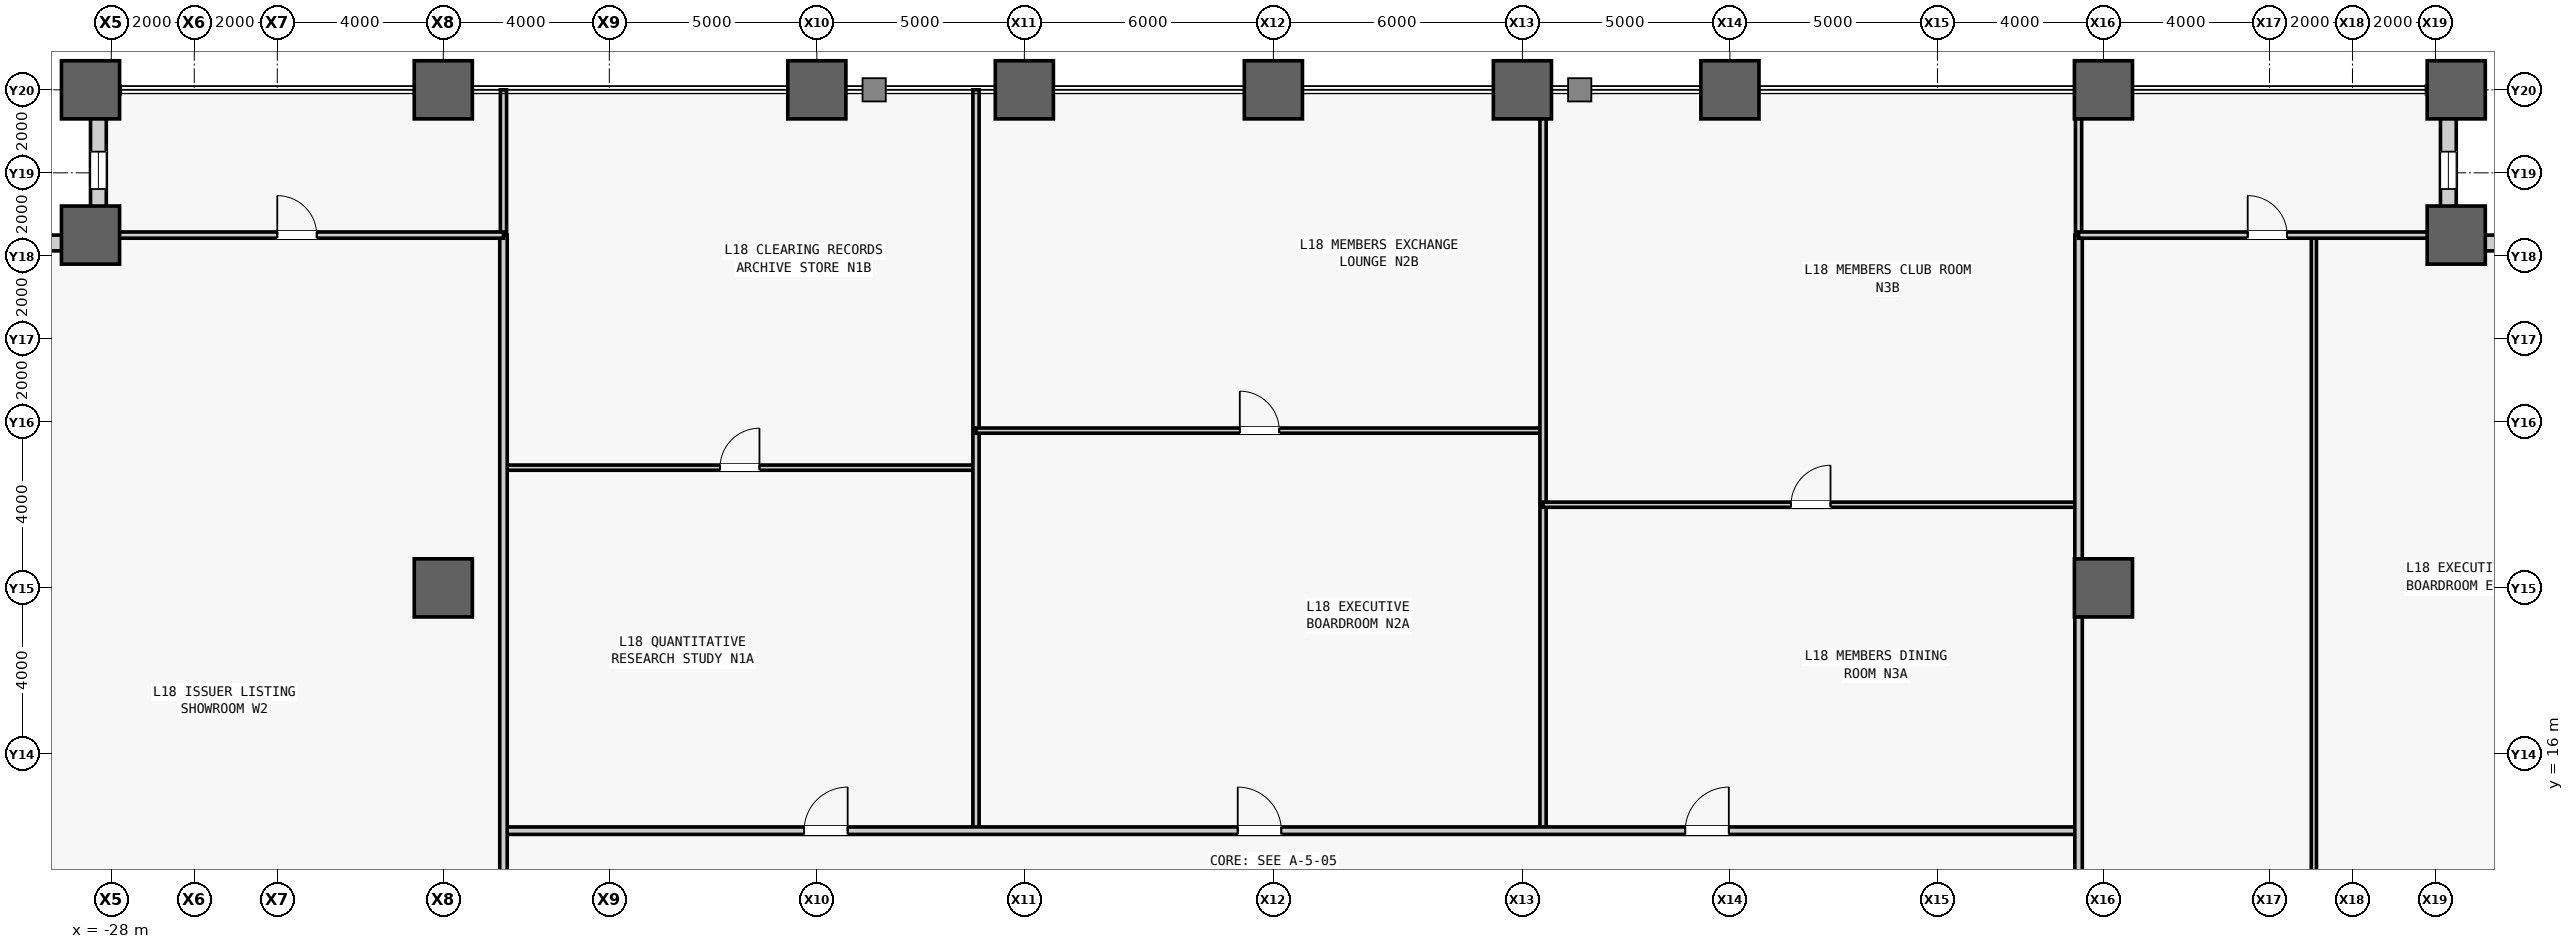
"""IFC4 building model, lengths in metres.
Left out: names, types, materials, properties, quantities, classifications, styles, units other than length and angle.
Written with IfcOpenShell. Run it as: python <this file> out.ifc"""

import sys

from ifc_helpers import new_model, si_unit, direction, frame, frame_2d, origin, origin_2d, place, context, subcontext, project, spatial, rectangle, hollow_rectangle, extrude, source, transform, mapped, element, fill, save


model = new_model("IFC4")
c1 = context("Model", 3, precision=1e-05, world=origin(), true_north=direction((0.0, 1.0)))
c2 = subcontext(c1, "Body", "Model", "MODEL_VIEW")
j1 = project(units=[si_unit("LENGTHUNIT", "METRE"), si_unit("PLANEANGLEUNIT", "RADIAN")], contexts=[c1])
p1 = place(None, origin())
s1 = spatial("IfcSite", under=j1, at=p1, CompositionType="ELEMENT")
p2 = place(p1, origin())
s2 = spatial("IfcBuilding", under=s1, at=p2, CompositionType="ELEMENT")
p3 = place(p2, frame((0.0, 0.0, 83.0)))
s3 = spatial("IfcBuildingStorey", under=s2, at=p3, CompositionType="ELEMENT", Elevation=83.0)
m1 = source(origin(), c2, "Body", "SweptSolid", [
    extrude(hollow_rectangle(XDim=1.4, YDim=1.4, WallThickness=0.075, at=origin_2d()), origin(), (0.0, 0.0, 1.0), 4.2),
])
for number, where, z_axis, x_axis in (
    (1, (-28.5, 28.5, 0.0), (0.0, 0.0, 1.0), (1.0, 0.0, 0.0)),
    (2, (-28.5, 32.0, 0.0), (0.0, 0.0, 1.0), (1.0, 0.0, 0.0)),
    (3, (-20.0, 20.0, 0.0), (0.0, 0.0, 1.0), (1.0, 0.0, 0.0)),
    (4, (-20.0, 32.0, 0.0), (0.0, 0.0, 1.0), (1.0, 0.0, 0.0)),
    (5, (-11.0, 32.0, 0.0), (0.0, 0.0, 1.0), (1.0, 0.0, 0.0)),
    (6, (-6.0, 32.0, 0.0), (0.0, 0.0, 1.0), (1.0, 0.0, 0.0)),
    (7, (0.0, 32.0, 0.0), (0.0, 0.0, 1.0), (1.0, 0.0, 0.0)),
    (8, (6.0, 32.0, 0.0), (0.0, 0.0, 1.0), (1.0, 0.0, 0.0)),
    (9, (11.0, 32.0, 0.0), (0.0, 0.0, 1.0), (1.0, 0.0, 0.0)),
    (10, (20.0, 20.0, 0.0), (0.0, 0.0, 1.0), (1.0, 0.0, 0.0)),
    (11, (20.0, 32.0, 0.0), (0.0, 0.0, 1.0), (1.0, 0.0, 0.0)),
    (12, (28.5, 28.5, 0.0), (0.0, 0.0, 1.0), (1.0, 0.0, 0.0)),
    (13, (28.5, 32.0, 0.0), (0.0, 0.0, 1.0), (1.0, 0.0, 0.0)),
):
    element("IfcColumn", number, at=place(p3, frame(where, z_axis=z_axis, x_axis=x_axis)), inside=s3, PredefinedType="COLUMN", context=c2, shape_type="MappedRepresentation", body=[
        mapped(m1, transform((0.0, 0.0, 0.0), scale=1.0)),
    ])
m2 = source(origin(), c2, "Body", "SweptSolid", [
    extrude(rectangle(XDim=3.12, YDim=0.38, at=frame_2d((1.56, 0.0))), origin(), (0.0, 0.0, 1.0), 3.245),
])
p4 = place(p3, frame((28.5, 28.31, 0.0), z_axis=(0.0, 0.0, 1.0), x_axis=(1.0, 0.0, 0.0)))
e14 = element("IfcWall", 14, at=p4, inside=s3, PredefinedType="STANDARD", context=c2, shape_type="MappedRepresentation", body=[
    mapped(m2, transform((0.0, 0.0, 0.0), scale=1.0)),
])
m3 = source(origin(), c2, "Body", "SweptSolid", [
    extrude(rectangle(XDim=0.9, YDim=2.4, at=frame_2d((0.45, 1.2))), frame((0.0, 0.2, 0.0), z_axis=(0.0, -1.0, 0.0), x_axis=(1.0, 0.0, 0.0)), (0.0, 0.0, 1.0), 0.4),
])
p5 = place(p4, frame((1.11, 0.0, 0.5)))
e15 = element("IfcOpeningElement", 15, at=p5, cuts=e14, PredefinedType="OPENING", context=c2, shape_type="MappedRepresentation", body=[
    mapped(m3, transform((0.0, 0.0, 0.0), scale=1.0)),
])
p6 = place(p3, frame((28.31, 28.5, 0.0), z_axis=(0.0, 0.0, 1.0), x_axis=(0.0, 1.0, 0.0)))
e16 = element("IfcWall", 16, at=p6, inside=s3, PredefinedType="STANDARD", context=c2, shape_type="MappedRepresentation", body=[
    mapped(m2, transform((0.0, 0.0, 0.0), scale=1.0)),
])
p7 = place(p6, frame((1.11, 0.0, 0.5)))
e17 = element("IfcOpeningElement", 17, at=p7, cuts=e16, PredefinedType="OPENING", context=c2, shape_type="MappedRepresentation", body=[
    mapped(m3, transform((0.0, 0.0, 0.0), scale=1.0)),
])
p8 = place(p3, frame((-28.31, 28.5, 0.0), z_axis=(0.0, 0.0, 1.0), x_axis=(0.0, 1.0, 0.0)))
e18 = element("IfcWall", 18, at=p8, inside=s3, PredefinedType="STANDARD", context=c2, shape_type="MappedRepresentation", body=[
    mapped(m2, transform((0.0, 0.0, 0.0), scale=1.0)),
])
p9 = place(p8, frame((1.11, 0.0, 0.5)))
e19 = element("IfcOpeningElement", 19, at=p9, cuts=e18, PredefinedType="OPENING", context=c2, shape_type="MappedRepresentation", body=[
    mapped(m3, transform((0.0, 0.0, 0.0), scale=1.0)),
])
p10 = place(p3, frame((-28.5, 28.31, 0.0), z_axis=(0.0, 0.0, 1.0), x_axis=(-1.0, 0.0, 0.0)))
e20 = element("IfcWall", 20, at=p10, inside=s3, PredefinedType="STANDARD", context=c2, shape_type="MappedRepresentation", body=[
    mapped(m2, transform((0.0, 0.0, 0.0), scale=1.0)),
])
p11 = place(p10, frame((1.11, 0.0, 0.5)))
e21 = element("IfcOpeningElement", 21, at=p11, cuts=e20, PredefinedType="OPENING", context=c2, shape_type="MappedRepresentation", body=[
    mapped(m3, transform((0.0, 0.0, 0.0), scale=1.0)),
])
m4 = source(origin(), c2, "Body", "SweptSolid", [
    extrude(rectangle(XDim=11.385, YDim=0.125, at=frame_2d((5.692, 0.0))), origin(), (0.0, 0.0, 1.0), 3.94),
])
p12 = place(p3, frame((-18.55, 22.896, 0.0), z_axis=(0.0, 0.0, 1.0), x_axis=(1.0, 0.0, 0.0)))
e22 = element("IfcWall", 22, at=p12, inside=s3, PredefinedType="PARTITIONING", context=c2, shape_type="MappedRepresentation", body=[
    mapped(m4, transform((0.0, 0.0, 0.0), scale=1.0)),
])
m5 = source(origin(), c2, "Body", "SweptSolid", [
    extrude(rectangle(XDim=0.95, YDim=2.15, at=frame_2d((0.475, 1.075))), frame((0.0, 0.073, 0.0), z_axis=(0.0, -1.0, 0.0), x_axis=(1.0, 0.0, 0.0)), (0.0, 0.0, 1.0), 0.145),
])
p13 = place(p12, frame((5.218, 0.0, 0.0)))
e23 = element("IfcOpeningElement", 23, at=p13, cuts=e22, PredefinedType="OPENING", context=c2, shape_type="MappedRepresentation", body=[
    mapped(m5, transform((0.0, 0.0, 0.0), scale=1.0)),
])
m6 = source(origin(), c2, "Body", "SweptSolid", [
    extrude(rectangle(XDim=17.85, YDim=0.15, at=frame_2d((8.925, 0.0))), origin(), (0.0, 0.0, 1.0), 3.94),
])
p14 = place(p3, frame((-7.165, 14.15, 0.0), z_axis=(0.0, 0.0, 1.0), x_axis=(0.0, 1.0, 0.0)))
e24 = element("IfcWall", 24, at=p14, inside=s3, PredefinedType="PARTITIONING", context=c2, shape_type="MappedRepresentation", body=[
    mapped(m6, transform((0.0, 0.0, 0.0), scale=1.0)),
])
m7 = source(origin(), c2, "Body", "SweptSolid", [
    extrude(rectangle(XDim=13.662, YDim=0.125, at=frame_2d((6.831, 0.0))), origin(), (0.0, 0.0, 1.0), 3.94),
])
p15 = place(p3, frame((-7.165, 23.789, 0.0), z_axis=(0.0, 0.0, 1.0), x_axis=(1.0, 0.0, 0.0)))
e25 = element("IfcWall", 25, at=p15, inside=s3, PredefinedType="PARTITIONING", context=c2, shape_type="MappedRepresentation", body=[
    mapped(m7, transform((0.0, 0.0, 0.0), scale=1.0)),
])
p16 = place(p15, frame((6.356, 0.0, 0.0)))
e26 = element("IfcOpeningElement", 26, at=p16, cuts=e25, PredefinedType="OPENING", context=c2, shape_type="MappedRepresentation", body=[
    mapped(m5, transform((0.0, 0.0, 0.0), scale=1.0)),
])
p17 = place(p3, frame((6.497, 14.15, 0.0), z_axis=(0.0, 0.0, 1.0), x_axis=(0.0, 1.0, 0.0)))
e27 = element("IfcWall", 27, at=p17, inside=s3, PredefinedType="PARTITIONING", context=c2, shape_type="MappedRepresentation", body=[
    mapped(m6, transform((0.0, 0.0, 0.0), scale=1.0)),
])
m8 = source(origin(), c2, "Body", "SweptSolid", [
    extrude(rectangle(XDim=12.903, YDim=0.125, at=frame_2d((6.451, 0.0))), origin(), (0.0, 0.0, 1.0), 3.94),
])
p18 = place(p3, frame((6.497, 22.004, 0.0), z_axis=(0.0, 0.0, 1.0), x_axis=(1.0, 0.0, 0.0)))
e28 = element("IfcWall", 28, at=p18, inside=s3, PredefinedType="PARTITIONING", context=c2, shape_type="MappedRepresentation", body=[
    mapped(m8, transform((0.0, 0.0, 0.0), scale=1.0)),
])
p19 = place(p18, frame((5.977, 0.0, 0.0)))
e29 = element("IfcOpeningElement", 29, at=p19, cuts=e28, PredefinedType="OPENING", context=c2, shape_type="MappedRepresentation", body=[
    mapped(m5, transform((0.0, 0.0, 0.0), scale=1.0)),
])
m9 = source(origin(), c2, "Body", "SweptSolid", [
    extrude(rectangle(XDim=37.95, YDim=0.18, at=frame_2d((18.975, 0.0))), origin(), (0.0, 0.0, 1.0), 3.94),
])
p20 = place(p3, frame((-18.55, 14.15, 0.0), z_axis=(0.0, 0.0, 1.0), x_axis=(1.0, 0.0, 0.0)))
e30 = element("IfcWall", 30, at=p20, inside=s3, PredefinedType="PARTITIONING", context=c2, shape_type="MappedRepresentation", body=[
    mapped(m9, transform((0.0, 0.0, 0.0), scale=1.0)),
])
m10 = source(origin(), c2, "Body", "SweptSolid", [
    extrude(rectangle(XDim=1.05, YDim=2.2, at=frame_2d((0.525, 1.1))), frame((0.0, 0.1, 0.0), z_axis=(0.0, -1.0, 0.0), x_axis=(1.0, 0.0, 0.0)), (0.0, 0.0, 1.0), 0.2),
])
p21 = place(p20, frame((7.242, 0.0, 0.0)))
e31 = element("IfcOpeningElement", 31, at=p21, cuts=e30, PredefinedType="OPENING", context=c2, shape_type="MappedRepresentation", body=[
    mapped(m10, transform((0.0, 0.0, 0.0), scale=1.0)),
])
p22 = place(p20, frame((17.691, 0.0, 0.0)))
e32 = element("IfcOpeningElement", 32, at=p22, cuts=e30, PredefinedType="OPENING", context=c2, shape_type="MappedRepresentation", body=[
    mapped(m10, transform((0.0, 0.0, 0.0), scale=1.0)),
])
p23 = place(p20, frame((28.473, 0.0, 0.0)))
e33 = element("IfcOpeningElement", 33, at=p23, cuts=e30, PredefinedType="OPENING", context=c2, shape_type="MappedRepresentation", body=[
    mapped(m10, transform((0.0, 0.0, 0.0), scale=1.0)),
])
m11 = source(origin(), c2, "Body", "SweptSolid", [
    extrude(rectangle(XDim=3.5, YDim=0.15, at=frame_2d((1.75, 0.0))), origin(), (0.0, 0.0, 1.0), 3.94),
])
for number, where, z_axis, x_axis in (
    (34, (-18.55, 28.5, 0.0), (0.0, 0.0, 1.0), (0.0, 1.0, 0.0)),
    (35, (19.4, 28.5, 0.0), (0.0, 0.0, 1.0), (0.0, 1.0, 0.0)),
):
    element("IfcWall", number, at=place(p3, frame(where, z_axis=z_axis, x_axis=x_axis)), inside=s3, PredefinedType="PARTITIONING", context=c2, shape_type="MappedRepresentation", body=[
        mapped(m11, transform((0.0, 0.0, 0.0), scale=1.0)),
    ])
m12 = source(origin(), c2, "Body", "SweptSolid", [
    extrude(rectangle(XDim=57.0, YDim=0.18, at=frame_2d((28.5, 0.0))), origin(), (0.0, 0.0, 1.0), 3.94),
])
p24 = place(p3, frame((-18.55, -28.5, 0.0), z_axis=(0.0, 0.0, 1.0), x_axis=(0.0, 1.0, 0.0)))
e36 = element("IfcWall", 36, at=p24, inside=s3, PredefinedType="PARTITIONING", context=c2, shape_type="MappedRepresentation", body=[
    mapped(m12, transform((0.0, 0.0, 0.0), scale=1.0)),
])
m13 = source(origin(), c2, "Body", "SweptSolid", [
    extrude(rectangle(XDim=0.95, YDim=2.15, at=frame_2d((0.475, 1.075))), frame((0.0, 0.1, 0.0), z_axis=(0.0, -1.0, 0.0), x_axis=(1.0, 0.0, 0.0)), (0.0, 0.0, 1.0), 0.2),
])
p25 = place(p24, frame((20.118, 0.0, 0.0)))
e37 = element("IfcOpeningElement", 37, at=p25, cuts=e36, PredefinedType="OPENING", context=c2, shape_type="MappedRepresentation", body=[
    mapped(m13, transform((0.0, 0.0, 0.0), scale=1.0)),
])
p26 = place(p24, frame((33.668, 0.0, 0.0)))
e38 = element("IfcOpeningElement", 38, at=p26, cuts=e36, PredefinedType="OPENING", context=c2, shape_type="MappedRepresentation", body=[
    mapped(m13, transform((0.0, 0.0, 0.0), scale=1.0)),
])
m14 = source(origin(), c2, "Body", "SweptSolid", [
    extrude(rectangle(XDim=19.444, YDim=0.125, at=frame_2d((9.722, 0.0))), origin(), (0.0, 0.0, 1.0), 3.94),
])
p27 = place(p3, frame((25.07, 9.056, 0.0), z_axis=(0.0, 0.0, 1.0), x_axis=(0.0, 1.0, 0.0)))
e39 = element("IfcWall", 39, at=p27, inside=s3, PredefinedType="PARTITIONING", context=c2, shape_type="MappedRepresentation", body=[
    mapped(m14, transform((0.0, 0.0, 0.0), scale=1.0)),
])
p28 = place(p27, frame((2.072, 0.0, 0.0)))
e40 = element("IfcOpeningElement", 40, at=p28, cuts=e39, PredefinedType="OPENING", context=c2, shape_type="MappedRepresentation", body=[
    mapped(m5, transform((0.0, 0.0, 0.0), scale=1.0)),
])
m15 = source(origin(), c2, "Body", "SweptSolid", [
    extrude(rectangle(XDim=57.0, YDim=0.18, at=frame_2d((28.5, 0.0))), origin(), (0.0, 0.0, 1.0), 3.471),
])
p29 = place(p3, frame((19.4, -28.5, 0.0), z_axis=(0.0, 0.0, 1.0), x_axis=(0.0, 1.0, 0.0)))
e41 = element("IfcWall", 41, at=p29, inside=s3, PredefinedType="PARTITIONING", context=c2, shape_type="MappedRepresentation", body=[
    mapped(m15, transform((0.0, 0.0, 0.0), scale=1.0)),
])
p30 = place(p29, frame((17.571, 0.0, 0.0)))
e42 = element("IfcOpeningElement", 42, at=p30, cuts=e41, PredefinedType="OPENING", context=c2, shape_type="MappedRepresentation", body=[
    mapped(m13, transform((0.0, 0.0, 0.0), scale=1.0)),
])
p31 = place(p29, frame((25.053, 0.0, 0.0)))
e43 = element("IfcOpeningElement", 43, at=p31, cuts=e41, PredefinedType="OPENING", context=c2, shape_type="MappedRepresentation", body=[
    mapped(m13, transform((0.0, 0.0, 0.0), scale=1.0)),
])
p32 = place(p29, frame((33.26, 0.0, 0.0)))
e44 = element("IfcOpeningElement", 44, at=p32, cuts=e41, PredefinedType="OPENING", context=c2, shape_type="MappedRepresentation", body=[
    mapped(m13, transform((0.0, 0.0, 0.0), scale=1.0)),
])
p33 = place(p29, frame((39.328, 0.0, 0.0)))
e45 = element("IfcOpeningElement", 45, at=p33, cuts=e41, PredefinedType="OPENING", context=c2, shape_type="MappedRepresentation", body=[
    mapped(m13, transform((0.0, 0.0, 0.0), scale=1.0)),
])
m16 = source(origin(), c2, "Body", "SweptSolid", [
    extrude(rectangle(XDim=9.95, YDim=0.15, at=frame_2d((4.975, 0.0))), origin(), (0.0, 0.0, 1.0), 3.94),
])
p34 = place(p3, frame((-28.5, 28.5, 0.0), z_axis=(0.0, 0.0, 1.0), x_axis=(1.0, 0.0, 0.0)))
e46 = element("IfcWall", 46, at=p34, inside=s3, PredefinedType="PARTITIONING", context=c2, shape_type="MappedRepresentation", body=[
    mapped(m16, transform((0.0, 0.0, 0.0), scale=1.0)),
])
m17 = source(origin(), c2, "Body", "SweptSolid", [
    extrude(rectangle(XDim=0.95, YDim=2.15, at=frame_2d((0.475, 1.075))), frame((0.0, 0.085, 0.0), z_axis=(0.0, -1.0, 0.0), x_axis=(1.0, 0.0, 0.0)), (0.0, 0.0, 1.0), 0.17),
])
p35 = place(p34, frame((4.5, 0.0, 0.0)))
e47 = element("IfcOpeningElement", 47, at=p35, cuts=e46, PredefinedType="OPENING", context=c2, shape_type="MappedRepresentation", body=[
    mapped(m17, transform((0.0, 0.0, 0.0), scale=1.0)),
])
m18 = source(origin(), c2, "Body", "SweptSolid", [
    extrude(rectangle(XDim=9.1, YDim=0.15, at=frame_2d((4.55, 0.0))), origin(), (0.0, 0.0, 1.0), 3.94),
])
p36 = place(p3, frame((19.4, 28.5, 0.0), z_axis=(0.0, 0.0, 1.0), x_axis=(1.0, 0.0, 0.0)))
e48 = element("IfcWall", 48, at=p36, inside=s3, PredefinedType="PARTITIONING", context=c2, shape_type="MappedRepresentation", body=[
    mapped(m18, transform((0.0, 0.0, 0.0), scale=1.0)),
])
p37 = place(p36, frame((4.075, 0.0, 0.0)))
e49 = element("IfcOpeningElement", 49, at=p37, cuts=e48, PredefinedType="OPENING", context=c2, shape_type="MappedRepresentation", body=[
    mapped(m17, transform((0.0, 0.0, 0.0), scale=1.0)),
])
m19 = source(origin(), c2, "Body", "SweptSolid", [
    extrude(rectangle(XDim=0.9, YDim=2.4, at=frame_2d((0.45, 1.2))), frame((0.0, 0.03, 0.0), z_axis=(0.0, -1.0, 0.0), x_axis=(1.0, 0.0, 0.0)), (0.0, 0.0, 1.0), 0.06),
])
p38 = place(p7, origin())
e50 = element("IfcWindow", 50, at=p38, inside=s3, PartitioningType="SINGLE_PANEL", PredefinedType="WINDOW", context=c2, shape_type="MappedRepresentation", body=[
    mapped(m19, transform((0.0, 0.0, 0.0), scale=1.0)),
])
fill(e17, e50)
p39 = place(p9, origin())
e51 = element("IfcWindow", 51, at=p39, inside=s3, PartitioningType="SINGLE_PANEL", PredefinedType="WINDOW", context=c2, shape_type="MappedRepresentation", body=[
    mapped(m19, transform((0.0, 0.0, 0.0), scale=1.0)),
])
fill(e19, e51)
m20 = source(origin(), c2, "Body", "SweptSolid", [
    extrude(rectangle(XDim=0.95, YDim=2.15, at=frame_2d((0.475, 1.075))), frame((0.0, 0.025, 0.0), z_axis=(0.0, -1.0, 0.0), x_axis=(1.0, 0.0, 0.0)), (0.0, 0.0, 1.0), 0.05),
])
p40 = place(p13, origin())
e52 = element("IfcDoor", 52, at=p40, inside=s3, OperationType="SINGLE_SWING_RIGHT", PredefinedType="DOOR", context=c2, shape_type="MappedRepresentation", body=[
    mapped(m20, transform((0.0, 0.0, 0.0), scale=1.0)),
])
fill(e23, e52)
p41 = place(p16, origin())
e53 = element("IfcDoor", 53, at=p41, inside=s3, OperationType="SINGLE_SWING_LEFT", PredefinedType="DOOR", context=c2, shape_type="MappedRepresentation", body=[
    mapped(m20, transform((0.0, 0.0, 0.0), scale=1.0)),
])
fill(e26, e53)
p42 = place(p19, origin())
e54 = element("IfcDoor", 54, at=p42, inside=s3, OperationType="SINGLE_SWING_RIGHT", PredefinedType="DOOR", context=c2, shape_type="MappedRepresentation", body=[
    mapped(m20, transform((0.0, 0.0, 0.0), scale=1.0)),
])
fill(e29, e54)
m21 = source(origin(), c2, "Body", "SweptSolid", [
    extrude(rectangle(XDim=1.05, YDim=2.2, at=frame_2d((0.525, 1.1))), frame((0.0, 0.025, 0.0), z_axis=(0.0, -1.0, 0.0), x_axis=(1.0, 0.0, 0.0)), (0.0, 0.0, 1.0), 0.05),
])
p43 = place(p21, origin())
e55 = element("IfcDoor", 55, at=p43, inside=s3, OperationType="SINGLE_SWING_RIGHT", PredefinedType="DOOR", context=c2, shape_type="MappedRepresentation", body=[
    mapped(m21, transform((0.0, 0.0, 0.0), scale=1.0)),
])
fill(e31, e55)
p44 = place(p22, origin())
e56 = element("IfcDoor", 56, at=p44, inside=s3, OperationType="SINGLE_SWING_LEFT", PredefinedType="DOOR", context=c2, shape_type="MappedRepresentation", body=[
    mapped(m21, transform((0.0, 0.0, 0.0), scale=1.0)),
])
fill(e32, e56)
p45 = place(p23, origin())
e57 = element("IfcDoor", 57, at=p45, inside=s3, OperationType="SINGLE_SWING_RIGHT", PredefinedType="DOOR", context=c2, shape_type="MappedRepresentation", body=[
    mapped(m21, transform((0.0, 0.0, 0.0), scale=1.0)),
])
fill(e33, e57)
p46 = place(p35, origin())
e58 = element("IfcDoor", 58, at=p46, inside=s3, OperationType="SINGLE_SWING_LEFT", PredefinedType="DOOR", context=c2, shape_type="MappedRepresentation", body=[
    mapped(m20, transform((0.0, 0.0, 0.0), scale=1.0)),
])
fill(e47, e58)
p47 = place(p37, origin())
e59 = element("IfcDoor", 59, at=p47, inside=s3, OperationType="SINGLE_SWING_LEFT", PredefinedType="DOOR", context=c2, shape_type="MappedRepresentation", body=[
    mapped(m20, transform((0.0, 0.0, 0.0), scale=1.0)),
])
fill(e49, e59)
save(model, sys.argv[1])
